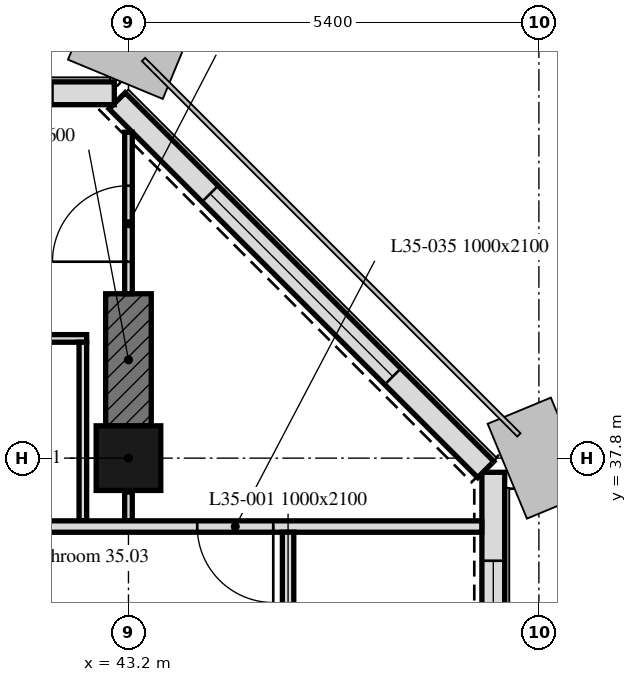
"""IFC4 building model, lengths in metres.
Left out: names, types, materials, properties, quantities, classifications, styles, units other than length and angle.
Written with IfcOpenShell. Run it as: python <this file> out.ifc"""

import sys

from ifc_helpers import new_model, si_unit, direction, frame, frame_2d, origin, origin_2d, place, context, subcontext, project, spatial, rectangle, extrude, element, fill, save


model = new_model("IFC4")
c1 = context("Model", 3, precision=1e-05, world=origin(), true_north=direction((0.0, 1.0)))
c2 = subcontext(c1, "Body", "Model", "MODEL_VIEW")
j1 = project(units=[si_unit("LENGTHUNIT", "METRE"), si_unit("PLANEANGLEUNIT", "RADIAN")], contexts=[c1])
p1 = place(None, origin())
s1 = spatial("IfcSite", under=j1, at=p1, CompositionType="ELEMENT")
p2 = place(p1, origin())
s2 = spatial("IfcBuilding", under=s1, at=p2, CompositionType="ELEMENT")
p3 = place(p2, frame((0.0, 0.0, 152.8)))
s3 = spatial("IfcBuildingStorey", under=s2, at=p3, CompositionType="ELEMENT", Elevation=152.8)
p4 = place(p3, frame((43.2, 37.8, 0.0), z_axis=(0.0, 0.0, 1.0), x_axis=(1.0, 0.0, 0.0)))
e1 = element("IfcColumn", 1, at=p4, inside=s3, PredefinedType="COLUMN", context=c2, shape_type="SweptSolid", body=[
    extrude(rectangle(XDim=0.85, YDim=0.85, at=origin_2d()), origin(), (0.0, 0.0, 1.0), 3.0),
])
p5 = place(p3, frame((43.2, 38.225, 0.0), z_axis=(0.0, 0.0, 1.0), x_axis=(0.0, 1.0, 0.0)))
e2 = element("IfcWall", 2, at=p5, inside=s3, PredefinedType="SHEAR", context=c2, shape_type="SweptSolid", body=[
    extrude(rectangle(XDim=1.737, YDim=0.6, at=frame_2d((0.869, 0.0))), origin(), (0.0, 0.0, 1.0), 3.0),
])
p6 = place(p3, frame((48.0, 5.586, 0.0), z_axis=(0.0, 0.0, 1.0), x_axis=(0.0, 1.0, 0.0)))
e3 = element("IfcWall", 3, at=p6, inside=s3, PredefinedType="SOLIDWALL", context=c2, shape_type="SweptSolid", body=[
    extrude(rectangle(XDim=32.027, YDim=0.3, at=frame_2d((16.014, 0.0))), origin(), (0.0, 0.0, 1.0), 3.0),
])
p7 = place(p6, frame((1.789, 0.0, 0.9)))
e4 = element("IfcOpeningElement", 4, at=p7, cuts=e3, PredefinedType="OPENING", context=c2, shape_type="SweptSolid", body=[
    extrude(rectangle(XDim=0.65, YDim=1.7, at=frame_2d((0.325, 0.85))), frame((0.0, 0.16, 0.0), z_axis=(0.0, -1.0, 0.0), x_axis=(1.0, 0.0, 0.0)), (0.0, 0.0, 1.0), 0.32),
])
p8 = place(p6, frame((2.764, 0.0, 0.9)))
e5 = element("IfcOpeningElement", 5, at=p8, cuts=e3, PredefinedType="OPENING", context=c2, shape_type="SweptSolid", body=[
    extrude(rectangle(XDim=1.1, YDim=1.7, at=frame_2d((0.55, 0.85))), frame((0.0, 0.16, 0.0), z_axis=(0.0, -1.0, 0.0), x_axis=(1.0, 0.0, 0.0)), (0.0, 0.0, 1.0), 0.32),
])
p9 = place(p6, frame((7.664, 0.0, 0.9)))
e6 = element("IfcOpeningElement", 6, at=p9, cuts=e3, PredefinedType="OPENING", context=c2, shape_type="SweptSolid", body=[
    extrude(rectangle(XDim=0.5, YDim=1.7, at=frame_2d((0.25, 0.85))), frame((0.0, 0.16, 0.0), z_axis=(0.0, -1.0, 0.0), x_axis=(1.0, 0.0, 0.0)), (0.0, 0.0, 1.0), 0.32),
])
p10 = place(p6, frame((13.064, 0.0, 0.9)))
e7 = element("IfcOpeningElement", 7, at=p10, cuts=e3, PredefinedType="OPENING", context=c2, shape_type="SweptSolid", body=[
    extrude(rectangle(XDim=0.5, YDim=1.7, at=frame_2d((0.25, 0.85))), frame((0.0, 0.16, 0.0), z_axis=(0.0, -1.0, 0.0), x_axis=(1.0, 0.0, 0.0)), (0.0, 0.0, 1.0), 0.32),
])
p11 = place(p6, frame((18.464, 0.0, 0.9)))
e8 = element("IfcOpeningElement", 8, at=p11, cuts=e3, PredefinedType="OPENING", context=c2, shape_type="SweptSolid", body=[
    extrude(rectangle(XDim=0.5, YDim=1.7, at=frame_2d((0.25, 0.85))), frame((0.0, 0.16, 0.0), z_axis=(0.0, -1.0, 0.0), x_axis=(1.0, 0.0, 0.0)), (0.0, 0.0, 1.0), 0.32),
])
p12 = place(p6, frame((23.864, 0.0, 0.9)))
e9 = element("IfcOpeningElement", 9, at=p12, cuts=e3, PredefinedType="OPENING", context=c2, shape_type="SweptSolid", body=[
    extrude(rectangle(XDim=0.5, YDim=1.7, at=frame_2d((0.25, 0.85))), frame((0.0, 0.16, 0.0), z_axis=(0.0, -1.0, 0.0), x_axis=(1.0, 0.0, 0.0)), (0.0, 0.0, 1.0), 0.32),
])
p13 = place(p6, frame((28.164, 0.0, 0.9)))
e10 = element("IfcOpeningElement", 10, at=p13, cuts=e3, PredefinedType="OPENING", context=c2, shape_type="SweptSolid", body=[
    extrude(rectangle(XDim=1.1, YDim=1.7, at=frame_2d((0.55, 0.85))), frame((0.0, 0.16, 0.0), z_axis=(0.0, -1.0, 0.0), x_axis=(1.0, 0.0, 0.0)), (0.0, 0.0, 1.0), 0.32),
])
p14 = place(p6, frame((29.764, 0.0, 0.9)))
e11 = element("IfcOpeningElement", 11, at=p14, cuts=e3, PredefinedType="OPENING", context=c2, shape_type="SweptSolid", body=[
    extrude(rectangle(XDim=1.1, YDim=1.7, at=frame_2d((0.55, 0.85))), frame((0.0, 0.16, 0.0), z_axis=(0.0, -1.0, 0.0), x_axis=(1.0, 0.0, 0.0)), (0.0, 0.0, 1.0), 0.32),
])
p15 = place(p3, frame((47.901, 37.65, 0.0), z_axis=(0.0, 0.0, 1.0), x_axis=(-0.707106781187, 0.707106781187, 0.0)))
e12 = element("IfcWall", 12, at=p15, inside=s3, PredefinedType="SOLIDWALL", context=c2, shape_type="SweptSolid", body=[
    extrude(rectangle(XDim=6.86, YDim=0.3, at=frame_2d((3.43, 0.0))), origin(), (0.0, 0.0, 1.0), 3.0),
])
p16 = place(p15, frame((1.73, 0.0, 0.9)))
e13 = element("IfcOpeningElement", 13, at=p16, cuts=e12, PredefinedType="OPENING", context=c2, shape_type="SweptSolid", body=[
    extrude(rectangle(XDim=3.4, YDim=1.7, at=frame_2d((1.7, 0.85))), frame((0.0, 0.16, 0.0), z_axis=(0.0, -1.0, 0.0), x_axis=(1.0, 0.0, 0.0)), (0.0, 0.0, 1.0), 0.32),
])
p17 = place(p3, frame((43.014, 42.6, 0.0), z_axis=(0.0, 0.0, 1.0), x_axis=(-1.0, 0.0, 0.0)))
e14 = element("IfcWall", 14, at=p17, inside=s3, PredefinedType="SOLIDWALL", context=c2, shape_type="SweptSolid", body=[
    extrude(rectangle(XDim=32.027, YDim=0.3, at=frame_2d((16.014, 0.0))), origin(), (0.0, 0.0, 1.0), 3.0),
])
p18 = place(p17, frame((0.814, 0.0, 0.9)))
e15 = element("IfcOpeningElement", 15, at=p18, cuts=e14, PredefinedType="OPENING", context=c2, shape_type="SweptSolid", body=[
    extrude(rectangle(XDim=3.4, YDim=1.7, at=frame_2d((1.7, 0.85))), frame((0.0, 0.16, 0.0), z_axis=(0.0, -1.0, 0.0), x_axis=(1.0, 0.0, 0.0)), (0.0, 0.0, 1.0), 0.32),
])
p19 = place(p17, frame((6.564, 0.0, 0.9)))
e16 = element("IfcOpeningElement", 16, at=p19, cuts=e14, PredefinedType="OPENING", context=c2, shape_type="SweptSolid", body=[
    extrude(rectangle(XDim=1.1, YDim=1.7, at=frame_2d((0.55, 0.85))), frame((0.0, 0.16, 0.0), z_axis=(0.0, -1.0, 0.0), x_axis=(1.0, 0.0, 0.0)), (0.0, 0.0, 1.0), 0.32),
])
p20 = place(p17, frame((11.614, 0.0, 0.9)))
e17 = element("IfcOpeningElement", 17, at=p20, cuts=e14, PredefinedType="OPENING", context=c2, shape_type="SweptSolid", body=[
    extrude(rectangle(XDim=3.4, YDim=1.7, at=frame_2d((1.7, 0.85))), frame((0.0, 0.16, 0.0), z_axis=(0.0, -1.0, 0.0), x_axis=(1.0, 0.0, 0.0)), (0.0, 0.0, 1.0), 0.32),
])
p21 = place(p17, frame((17.364, 0.0, 0.9)))
e18 = element("IfcOpeningElement", 18, at=p21, cuts=e14, PredefinedType="OPENING", context=c2, shape_type="SweptSolid", body=[
    extrude(rectangle(XDim=1.1, YDim=1.7, at=frame_2d((0.55, 0.85))), frame((0.0, 0.16, 0.0), z_axis=(0.0, -1.0, 0.0), x_axis=(1.0, 0.0, 0.0)), (0.0, 0.0, 1.0), 0.32),
])
p22 = place(p17, frame((22.414, 0.0, 0.9)))
e19 = element("IfcOpeningElement", 19, at=p22, cuts=e14, PredefinedType="OPENING", context=c2, shape_type="SweptSolid", body=[
    extrude(rectangle(XDim=3.4, YDim=1.7, at=frame_2d((1.7, 0.85))), frame((0.0, 0.16, 0.0), z_axis=(0.0, -1.0, 0.0), x_axis=(1.0, 0.0, 0.0)), (0.0, 0.0, 1.0), 0.32),
])
p23 = place(p17, frame((28.164, 0.0, 0.9)))
e20 = element("IfcOpeningElement", 20, at=p23, cuts=e14, PredefinedType="OPENING", context=c2, shape_type="SweptSolid", body=[
    extrude(rectangle(XDim=1.1, YDim=1.7, at=frame_2d((0.55, 0.85))), frame((0.0, 0.16, 0.0), z_axis=(0.0, -1.0, 0.0), x_axis=(1.0, 0.0, 0.0)), (0.0, 0.0, 1.0), 0.32),
])
p24 = place(p3, frame((40.25, 39.375, 0.0), z_axis=(0.0, 0.0, 1.0), x_axis=(1.0, 0.0, 0.0)))
e21 = element("IfcWall", 21, at=p24, inside=s3, PredefinedType="PARTITIONING", context=c2, shape_type="SweptSolid", body=[
    extrude(rectangle(XDim=2.4, YDim=0.1, at=frame_2d((1.2, 0.0))), origin(), (0.0, 0.0, 1.0), 3.0),
])
p25 = place(p24, frame((0.25, 0.0, 0.0)))
e22 = element("IfcOpeningElement", 22, at=p25, cuts=e21, PredefinedType="OPENING", context=c2, shape_type="SweptSolid", body=[
    extrude(rectangle(XDim=0.9, YDim=2.1, at=frame_2d((0.45, 1.05))), frame((0.0, 0.05, 0.0), z_axis=(0.0, -1.0, 0.0), x_axis=(1.0, 0.0, 0.0)), (0.0, 0.0, 1.0), 0.1),
])
p26 = place(p3, frame((42.6, 39.325, 0.0), z_axis=(0.0, 0.0, 1.0), x_axis=(0.0, -1.0, 0.0)))
e23 = element("IfcWall", 23, at=p26, inside=s3, PredefinedType="PARTITIONING", context=c2, shape_type="SweptSolid", body=[
    extrude(rectangle(XDim=2.35, YDim=0.1, at=frame_2d((1.175, 0.0))), origin(), (0.0, 0.0, 1.0), 3.0),
])
p27 = place(p3, frame((43.2, 36.975, 0.0), z_axis=(0.0, 0.0, 1.0), x_axis=(0.0, 1.0, 0.0)))
e24 = element("IfcWall", 24, at=p27, inside=s3, PredefinedType="PARTITIONING", context=c2, shape_type="SweptSolid", body=[
    extrude(rectangle(XDim=0.38, YDim=0.1, at=frame_2d((0.19, 0.0))), origin(), (0.0, 0.0, 1.0), 3.0),
])
p28 = place(p3, frame((43.2, 39.962, 0.0), z_axis=(0.0, 0.0, 1.0), x_axis=(0.0, 1.0, 0.0)))
e25 = element("IfcWall", 25, at=p28, inside=s3, PredefinedType="PARTITIONING", context=c2, shape_type="SweptSolid", body=[
    extrude(rectangle(XDim=2.125, YDim=0.1, at=frame_2d((1.063, 0.0))), origin(), (0.0, 0.0, 1.0), 3.0),
])
p29 = place(p28, frame((0.421, 0.0, 0.0)))
e26 = element("IfcOpeningElement", 26, at=p29, cuts=e25, PredefinedType="OPENING", context=c2, shape_type="SweptSolid", body=[
    extrude(rectangle(XDim=1.0, YDim=2.1, at=frame_2d((0.5, 1.05))), frame((0.0, 0.05, 0.0), z_axis=(0.0, -1.0, 0.0), x_axis=(1.0, 0.0, 0.0)), (0.0, 0.0, 1.0), 0.1),
])
p30 = place(p3, frame((47.849, 36.9, 0.0), z_axis=(0.0, 0.0, 1.0), x_axis=(-1.0, 0.0, 0.0)))
e27 = element("IfcWall", 27, at=p30, inside=s3, PredefinedType="PARTITIONING", context=c2, shape_type="SweptSolid", body=[
    extrude(rectangle(XDim=41.698, YDim=0.15, at=frame_2d((20.849, 0.0))), origin(), (0.0, 0.0, 1.0), 3.0),
])
p31 = place(p30, frame((27.649, 0.0, 0.0)))
e28 = element("IfcOpeningElement", 28, at=p31, cuts=e27, PredefinedType="OPENING", context=c2, shape_type="SweptSolid", body=[
    extrude(rectangle(XDim=1.0, YDim=2.1, at=frame_2d((0.5, 1.05))), frame((0.0, 0.075, 0.0), z_axis=(0.0, -1.0, 0.0), x_axis=(1.0, 0.0, 0.0)), (0.0, 0.0, 1.0), 0.15),
])
p32 = place(p30, frame((22.249, 0.0, 0.0)))
e29 = element("IfcOpeningElement", 29, at=p32, cuts=e27, PredefinedType="OPENING", context=c2, shape_type="SweptSolid", body=[
    extrude(rectangle(XDim=1.0, YDim=2.1, at=frame_2d((0.5, 1.05))), frame((0.0, 0.075, 0.0), z_axis=(0.0, -1.0, 0.0), x_axis=(1.0, 0.0, 0.0)), (0.0, 0.0, 1.0), 0.15),
])
p33 = place(p30, frame((16.849, 0.0, 0.0)))
e30 = element("IfcOpeningElement", 30, at=p33, cuts=e27, PredefinedType="OPENING", context=c2, shape_type="SweptSolid", body=[
    extrude(rectangle(XDim=1.0, YDim=2.1, at=frame_2d((0.5, 1.05))), frame((0.0, 0.075, 0.0), z_axis=(0.0, -1.0, 0.0), x_axis=(1.0, 0.0, 0.0)), (0.0, 0.0, 1.0), 0.15),
])
p34 = place(p30, frame((11.449, 0.0, 0.0)))
e31 = element("IfcOpeningElement", 31, at=p34, cuts=e27, PredefinedType="OPENING", context=c2, shape_type="SweptSolid", body=[
    extrude(rectangle(XDim=1.0, YDim=2.1, at=frame_2d((0.5, 1.05))), frame((0.0, 0.075, 0.0), z_axis=(0.0, -1.0, 0.0), x_axis=(1.0, 0.0, 0.0)), (0.0, 0.0, 1.0), 0.15),
])
p35 = place(p30, frame((2.744, 0.0, 0.0)))
e32 = element("IfcOpeningElement", 32, at=p35, cuts=e27, PredefinedType="OPENING", context=c2, shape_type="SweptSolid", body=[
    extrude(rectangle(XDim=1.0, YDim=2.1, at=frame_2d((0.5, 1.05))), frame((0.0, 0.075, 0.0), z_axis=(0.0, -1.0, 0.0), x_axis=(1.0, 0.0, 0.0)), (0.0, 0.0, 1.0), 0.15),
])
p36 = place(p30, frame((39.249, 0.0, 0.0)))
e33 = element("IfcOpeningElement", 33, at=p36, cuts=e27, PredefinedType="OPENING", context=c2, shape_type="SweptSolid", body=[
    extrude(rectangle(XDim=1.0, YDim=2.1, at=frame_2d((0.5, 1.05))), frame((0.0, 0.075, 0.0), z_axis=(0.0, -1.0, 0.0), x_axis=(1.0, 0.0, 0.0)), (0.0, 0.0, 1.0), 0.15),
])
p37 = place(p3, frame((45.3, 36.825, 0.0), z_axis=(0.0, 0.0, 1.0), x_axis=(0.0, -1.0, 0.0)))
e34 = element("IfcWall", 34, at=p37, inside=s3, PredefinedType="PARTITIONING", context=c2, shape_type="SweptSolid", body=[
    extrude(rectangle(XDim=29.55, YDim=0.15, at=frame_2d((14.775, 0.0))), origin(), (0.0, 0.0, 1.0), 2.4),
])
p38 = place(p37, frame((1.675, 0.0, 0.0)))
e35 = element("IfcOpeningElement", 35, at=p38, cuts=e34, PredefinedType="OPENING", context=c2, shape_type="SweptSolid", body=[
    extrude(rectangle(XDim=1.0, YDim=2.1, at=frame_2d((0.5, 1.05))), frame((0.0, 0.075, 0.0), z_axis=(0.0, -1.0, 0.0), x_axis=(1.0, 0.0, 0.0)), (0.0, 0.0, 1.0), 0.15),
])
p39 = place(p37, frame((17.425, 0.0, 0.0)))
e36 = element("IfcOpeningElement", 36, at=p39, cuts=e34, PredefinedType="OPENING", context=c2, shape_type="SweptSolid", body=[
    extrude(rectangle(XDim=1.0, YDim=2.1, at=frame_2d((0.5, 1.05))), frame((0.0, 0.075, 0.0), z_axis=(0.0, -1.0, 0.0), x_axis=(1.0, 0.0, 0.0)), (0.0, 0.0, 1.0), 0.15),
])
p40 = place(p37, frame((7.975, 0.0, 0.0)))
e37 = element("IfcOpeningElement", 37, at=p40, cuts=e34, PredefinedType="OPENING", context=c2, shape_type="SweptSolid", body=[
    extrude(rectangle(XDim=1.0, YDim=2.1, at=frame_2d((0.5, 1.05))), frame((0.0, 0.075, 0.0), z_axis=(0.0, -1.0, 0.0), x_axis=(1.0, 0.0, 0.0)), (0.0, 0.0, 1.0), 0.15),
])
p41 = place(p37, frame((23.275, 0.0, 0.0)))
e38 = element("IfcOpeningElement", 38, at=p41, cuts=e34, PredefinedType="OPENING", context=c2, shape_type="SweptSolid", body=[
    extrude(rectangle(XDim=1.0, YDim=2.1, at=frame_2d((0.5, 1.05))), frame((0.0, 0.075, 0.0), z_axis=(0.0, -1.0, 0.0), x_axis=(1.0, 0.0, 0.0)), (0.0, 0.0, 1.0), 0.15),
])
p42 = place(p14, origin())
e39 = element("IfcWindow", 39, at=p42, inside=s3, PartitioningType="SINGLE_PANEL", PredefinedType="WINDOW", context=c2, shape_type="SweptSolid", body=[
    extrude(rectangle(XDim=1.1, YDim=1.7, at=frame_2d((0.55, 0.85))), frame((0.0, 0.03, 0.0), z_axis=(0.0, -1.0, 0.0), x_axis=(1.0, 0.0, 0.0)), (0.0, 0.0, 1.0), 0.06),
])
fill(e11, e39)
p43 = place(p16, origin())
e40 = element("IfcWindow", 40, at=p43, inside=s3, PartitioningType="SINGLE_PANEL", PredefinedType="WINDOW", context=c2, shape_type="SweptSolid", body=[
    extrude(rectangle(XDim=3.4, YDim=1.7, at=frame_2d((1.7, 0.85))), frame((0.0, 0.03, 0.0), z_axis=(0.0, -1.0, 0.0), x_axis=(1.0, 0.0, 0.0)), (0.0, 0.0, 1.0), 0.06),
])
fill(e13, e40)
p44 = place(p29, origin())
e41 = element("IfcDoor", 41, at=p44, inside=s3, OperationType="SINGLE_SWING_LEFT", PredefinedType="DOOR", context=c2, shape_type="SweptSolid", body=[
    extrude(rectangle(XDim=1.0, YDim=2.1, at=frame_2d((0.5, 1.05))), frame((0.0, 0.025, 0.0), z_axis=(0.0, -1.0, 0.0), x_axis=(1.0, 0.0, 0.0)), (0.0, 0.0, 1.0), 0.05),
])
fill(e26, e41)
p45 = place(p35, origin())
e42 = element("IfcDoor", 42, at=p45, inside=s3, OperationType="SINGLE_SWING_LEFT", PredefinedType="DOOR", context=c2, shape_type="SweptSolid", body=[
    extrude(rectangle(XDim=1.0, YDim=2.1, at=frame_2d((0.5, 1.05))), frame((0.0, 0.025, 0.0), z_axis=(0.0, -1.0, 0.0), x_axis=(1.0, 0.0, 0.0)), (0.0, 0.0, 1.0), 0.05),
])
fill(e32, e42)
save(model, sys.argv[1])
